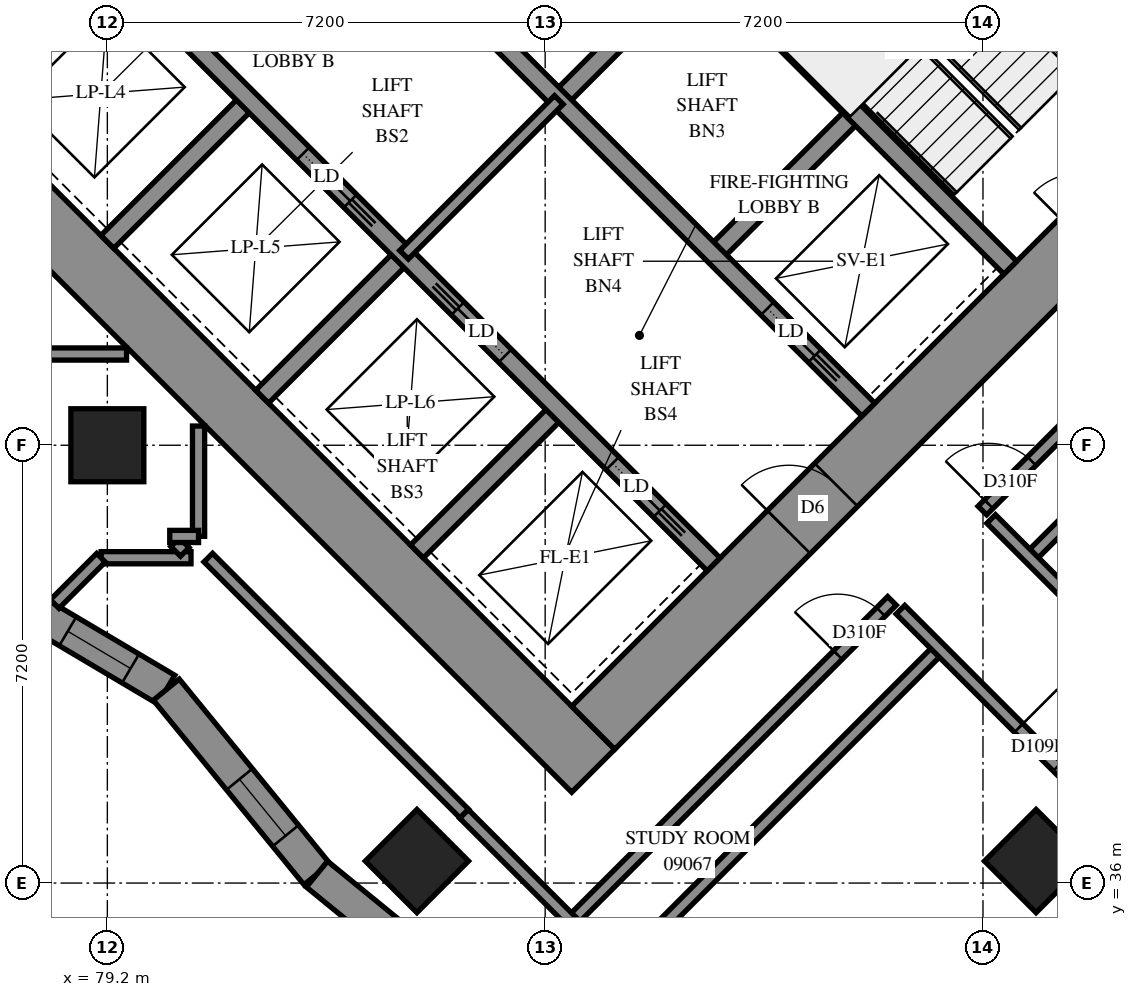
"""IFC4 building model, lengths in metres.
Left out: names, types, materials, properties, quantities, classifications, styles, units other than length and angle.
Written with IfcOpenShell. Run it as: python <this file> out.ifc"""

import sys

from ifc_helpers import new_model, si_unit, direction, frame, frame_2d, origin, origin_2d, place, context, subcontext, project, spatial, polyline, rectangle, outline, extrude, element, fill, save


model = new_model("IFC4")
c1 = context("Model", 3, precision=1e-05, world=origin(), true_north=direction((0.0, 1.0)))
c2 = subcontext(c1, "Body", "Model", "MODEL_VIEW")
j1 = project(units=[si_unit("LENGTHUNIT", "METRE"), si_unit("PLANEANGLEUNIT", "RADIAN")], contexts=[c1])
p1 = place(None, origin())
s1 = spatial("IfcSite", under=j1, at=p1, CompositionType="ELEMENT")
p2 = place(p1, origin())
s2 = spatial("IfcBuilding", under=s1, at=p2, CompositionType="ELEMENT")
p3 = place(p2, frame((0.0, 0.0, 37.2)))
s3 = spatial("IfcBuildingStorey", under=s2, at=p3, CompositionType="ELEMENT", Elevation=37.2)
for number, where, z_axis, x_axis in (
    (1, (79.2, 43.2, 0.0), (0.0, 0.0, 1.0), (1.0, 0.0, 0.0)),
    (2, (84.291, 36.362, 0.0), (0.0, 0.0, 1.0), (0.707, -0.707, 0.0)),
    (3, (94.474, 36.362, 0.0), (0.0, 0.0, 1.0), (0.707, -0.707, 0.0)),
):
    element("IfcColumn", number, at=place(p3, frame(where, z_axis=z_axis, x_axis=x_axis)), inside=s3, PredefinedType="COLUMN", context=c2, shape_type="SweptSolid", body=[
        extrude(rectangle(XDim=1.2, YDim=1.2, at=origin_2d()), origin(), (0.0, 0.0, 1.0), 3.1),
    ])
p4 = place(p3, frame((75.594, 49.443, -0.3), z_axis=(0.0, 0.0, 1.0), x_axis=(0.7071037324, -0.70710983, 0.0)))
e4 = element("IfcWall", 4, at=p4, inside=s3, PredefinedType="SHEAR", context=c2, shape_type="SweptSolid", body=[
    extrude(rectangle(XDim=16.4, YDim=1.0, at=frame_2d((8.2, 0.0))), origin(), (0.0, 0.0, 1.0), 2.7),
])
p5 = place(p3, frame((86.483, 60.333, -0.3), z_axis=(0.0, 0.0, 1.0), x_axis=(0.70710983, -0.7071037324, 0.0)))
e5 = element("IfcWall", 5, at=p5, inside=s3, PredefinedType="SHEAR", context=c2, shape_type="SweptSolid", body=[
    extrude(rectangle(XDim=16.4, YDim=1.0, at=frame_2d((8.2, 0.0))), origin(), (0.0, 0.0, 1.0), 2.7),
])
p6 = place(p5, frame((11.0, 0.0, 0.3)))
e6 = element("IfcOpeningElement", 6, at=p6, cuts=e5, PredefinedType="OPENING", context=c2, shape_type="SweptSolid", body=[
    extrude(rectangle(XDim=0.8, YDim=2.1, at=frame_2d((0.4, 1.05))), frame((0.0, 0.51, 0.0), z_axis=(0.0, -1.0, 0.0), x_axis=(1.0, 0.0, 0.0)), (0.0, 0.0, 1.0), 1.02),
])
p7 = place(p3, frame((76.301, 49.443, -0.3), z_axis=(0.0, 0.0, 1.0), x_axis=(0.7071067812, 0.7071067812, 0.0)))
e7 = element("IfcWall", 7, at=p7, inside=s3, PredefinedType="SHEAR", context=c2, shape_type="SweptSolid", body=[
    extrude(rectangle(XDim=14.4, YDim=1.0, at=frame_2d((7.2, 0.0))), origin(), (0.0, 0.0, 1.0), 2.7),
])
p8 = place(p7, frame((4.55, 0.0, 0.3)))
e8 = element("IfcOpeningElement", 8, at=p8, cuts=e7, PredefinedType="OPENING", context=c2, shape_type="SweptSolid", body=[
    extrude(rectangle(XDim=1.1, YDim=2.1, at=frame_2d((0.55, 1.05))), frame((0.0, 0.51, 0.0), z_axis=(0.0, -1.0, 0.0), x_axis=(1.0, 0.0, 0.0)), (0.0, 0.0, 1.0), 1.02),
])
p9 = place(p7, frame((11.35, 0.0, 0.3)))
e9 = element("IfcOpeningElement", 9, at=p9, cuts=e7, PredefinedType="OPENING", context=c2, shape_type="SweptSolid", body=[
    extrude(rectangle(XDim=1.1, YDim=2.1, at=frame_2d((0.55, 1.05))), frame((0.0, 0.51, 0.0), z_axis=(0.0, -1.0, 0.0), x_axis=(1.0, 0.0, 0.0)), (0.0, 0.0, 1.0), 1.02),
])
p10 = place(p3, frame((87.19, 38.554, -0.3), z_axis=(0.0, 0.0, 1.0), x_axis=(0.707103309, 0.7071102534, 0.0)))
e10 = element("IfcWall", 10, at=p10, inside=s3, PredefinedType="SHEAR", context=c2, shape_type="SweptSolid", body=[
    extrude(rectangle(XDim=14.4, YDim=1.0, at=frame_2d((7.2, 0.0))), origin(), (0.0, 0.0, 1.0), 2.7),
])
p11 = place(p10, frame((4.55, 0.0, 0.3)))
e11 = element("IfcOpeningElement", 11, at=p11, cuts=e10, PredefinedType="OPENING", context=c2, shape_type="SweptSolid", body=[
    extrude(rectangle(XDim=1.1, YDim=2.1, at=frame_2d((0.55, 1.05))), frame((0.0, 0.51, 0.0), z_axis=(0.0, -1.0, 0.0), x_axis=(1.0, 0.0, 0.0)), (0.0, 0.0, 1.0), 1.02),
])
p12 = place(p10, frame((11.35, 0.0, 0.3)))
e12 = element("IfcOpeningElement", 12, at=p12, cuts=e10, PredefinedType="OPENING", context=c2, shape_type="SweptSolid", body=[
    extrude(rectangle(XDim=1.1, YDim=2.1, at=frame_2d((0.55, 1.05))), frame((0.0, 0.51, 0.0), z_axis=(0.0, -1.0, 0.0), x_axis=(1.0, 0.0, 0.0)), (0.0, 0.0, 1.0), 1.02),
])
p13 = place(p3, frame((79.2, 46.544, 0.0), z_axis=(0.0, 0.0, 1.0), x_axis=(0.7071219326, 0.7070916295, 0.0)))
e13 = element("IfcWall", 13, at=p13, inside=s3, PredefinedType="SOLIDWALL", context=c2, shape_type="SweptSolid", body=[
    extrude(rectangle(XDim=3.3, YDim=0.3, at=frame_2d((1.65, 0.0))), origin(), (0.0, 0.0, 1.0), 3.1),
])
p14 = place(p3, frame((81.746, 43.999, 0.0), z_axis=(0.0, 0.0, 1.0), x_axis=(0.7071067812, 0.7071067812, 0.0)))
e14 = element("IfcWall", 14, at=p14, inside=s3, PredefinedType="SOLIDWALL", context=c2, shape_type="SweptSolid", body=[
    extrude(rectangle(XDim=3.3, YDim=0.3, at=frame_2d((1.65, 0.0))), origin(), (0.0, 0.0, 1.0), 3.1),
])
p15 = place(p3, frame((86.625, 48.878, 0.0), z_axis=(0.0, 0.0, 1.0), x_axis=(0.7071067812, 0.7071067812, 0.0)))
e15 = element("IfcWall", 15, at=p15, inside=s3, PredefinedType="SOLIDWALL", context=c2, shape_type="SweptSolid", body=[
    extrude(rectangle(XDim=3.3, YDim=0.3, at=frame_2d((1.65, 0.0))), origin(), (0.0, 0.0, 1.0), 3.1),
])
p16 = place(p3, frame((84.291, 41.453, 0.0), z_axis=(0.0, 0.0, 1.0), x_axis=(0.7071067812, 0.7071067812, 0.0)))
e16 = element("IfcWall", 16, at=p16, inside=s3, PredefinedType="SOLIDWALL", context=c2, shape_type="SweptSolid", body=[
    extrude(rectangle(XDim=3.3, YDim=0.3, at=frame_2d((1.65, 0.0))), origin(), (0.0, 0.0, 1.0), 3.1),
])
p17 = place(p3, frame((89.17, 46.332, 0.0), z_axis=(0.0, 0.0, 1.0), x_axis=(0.7071067812, 0.7071067812, 0.0)))
e17 = element("IfcWall", 17, at=p17, inside=s3, PredefinedType="SOLIDWALL", context=c2, shape_type="SweptSolid", body=[
    extrude(rectangle(XDim=3.3, YDim=0.3, at=frame_2d((1.65, 0.0))), origin(), (0.0, 0.0, 1.0), 3.1),
])
p18 = place(p3, frame((78.988, 51.423, 0.0), z_axis=(0.0, 0.0, 1.0), x_axis=(0.7071067812, -0.7071067812, 0.0)))
e18 = element("IfcWall", 18, at=p18, inside=s3, PredefinedType="SOLIDWALL", context=c2, shape_type="SweptSolid", body=[
    extrude(rectangle(XDim=14.4, YDim=0.3, at=frame_2d((7.2, 0.0))), origin(), (0.0, 0.0, 1.0), 3.1),
])
p19 = place(p18, frame((1.25, 0.0, 0.0)))
e19 = element("IfcOpeningElement", 19, at=p19, cuts=e18, PredefinedType="OPENING", context=c2, shape_type="SweptSolid", body=[
    extrude(rectangle(XDim=1.1, YDim=2.1, at=frame_2d((0.55, 1.05))), frame((0.0, 0.16, 0.0), z_axis=(0.0, -1.0, 0.0), x_axis=(1.0, 0.0, 0.0)), (0.0, 0.0, 1.0), 0.32),
])
p20 = place(p18, frame((4.85, 0.0, 0.0)))
e20 = element("IfcOpeningElement", 20, at=p20, cuts=e18, PredefinedType="OPENING", context=c2, shape_type="SweptSolid", body=[
    extrude(rectangle(XDim=1.1, YDim=2.1, at=frame_2d((0.55, 1.05))), frame((0.0, 0.16, 0.0), z_axis=(0.0, -1.0, 0.0), x_axis=(1.0, 0.0, 0.0)), (0.0, 0.0, 1.0), 0.32),
])
p21 = place(p18, frame((8.45, 0.0, 0.0)))
e21 = element("IfcOpeningElement", 21, at=p21, cuts=e18, PredefinedType="OPENING", context=c2, shape_type="SweptSolid", body=[
    extrude(rectangle(XDim=1.1, YDim=2.1, at=frame_2d((0.55, 1.05))), frame((0.0, 0.16, 0.0), z_axis=(0.0, -1.0, 0.0), x_axis=(1.0, 0.0, 0.0)), (0.0, 0.0, 1.0), 0.32),
])
p22 = place(p18, frame((12.05, 0.0, 0.0)))
e22 = element("IfcOpeningElement", 22, at=p22, cuts=e18, PredefinedType="OPENING", context=c2, shape_type="SweptSolid", body=[
    extrude(rectangle(XDim=1.1, YDim=2.1, at=frame_2d((0.55, 1.05))), frame((0.0, 0.16, 0.0), z_axis=(0.0, -1.0, 0.0), x_axis=(1.0, 0.0, 0.0)), (0.0, 0.0, 1.0), 0.32),
])
p23 = place(p3, frame((81.534, 53.969, 0.0), z_axis=(0.0, 0.0, 1.0), x_axis=(0.707103309, -0.7071102534, 0.0)))
e23 = element("IfcWall", 23, at=p23, inside=s3, PredefinedType="SOLIDWALL", context=c2, shape_type="SweptSolid", body=[
    extrude(rectangle(XDim=14.4, YDim=0.3, at=frame_2d((7.2, 0.0))), origin(), (0.0, 0.0, 1.0), 3.1),
])
p24 = place(p23, frame((12.05, 0.0, 0.0)))
e24 = element("IfcOpeningElement", 24, at=p24, cuts=e23, PredefinedType="OPENING", context=c2, shape_type="SweptSolid", body=[
    extrude(rectangle(XDim=1.1, YDim=2.1, at=frame_2d((0.55, 1.05))), frame((0.0, 0.16, 0.0), z_axis=(0.0, -1.0, 0.0), x_axis=(1.0, 0.0, 0.0)), (0.0, 0.0, 1.0), 0.32),
])
p25 = place(p3, frame((88.958, 51.211, 0.0), z_axis=(0.0, 0.0, 1.0), x_axis=(0.7070998367, -0.7071137256, 0.0)))
e25 = element("IfcWall", 25, at=p25, inside=s3, PredefinedType="SOLIDWALL", context=c2, shape_type="SweptSolid", body=[
    extrude(rectangle(XDim=7.2, YDim=0.3, at=frame_2d((3.6, 0.0))), origin(), (0.0, 0.0, 1.0), 3.1),
])
p26 = place(p3, frame((76.656, 41.263, 0.0), z_axis=(0.0, 0.0, 1.0), x_axis=(0.8602155685, -0.5099305597, 0.0)))
e26 = element("IfcWall", 26, at=p26, inside=s3, PredefinedType="SOLIDWALL", context=c2, shape_type="SweptSolid", body=[
    extrude(outline(polyline([(0.035, -0.275), (4.036, -0.275), (4.133, 0.275), (-0.035, 0.275), (0.035, -0.275)])), origin(), (0.0, 0.0, 1.0), 3.1),
])
p27 = place(p26, frame((2.202, 0.0, 0.5)))
e27 = element("IfcOpeningElement", 27, at=p27, cuts=e26, PredefinedType="OPENING", context=c2, shape_type="SweptSolid", body=[
    extrude(rectangle(XDim=1.2, YDim=2.45, at=frame_2d((0.6, 1.225))), frame((0.0, 0.285, 0.0), z_axis=(0.0, -1.0, 0.0), x_axis=(1.0, 0.0, 0.0)), (0.0, 0.0, 1.0), 0.57),
])
p28 = place(p26, frame((0.848, 0.0, 0.45)))
e28 = element("IfcOpeningElement", 28, at=p28, cuts=e26, PredefinedType="OPENING", context=c2, shape_type="SweptSolid", body=[
    extrude(rectangle(XDim=0.8, YDim=2.5, at=frame_2d((0.4, 1.25))), frame((0.0, 0.285, 0.0), z_axis=(0.0, -1.0, 0.0), x_axis=(1.0, 0.0, 0.0)), (0.0, 0.0, 1.0), 0.57),
])
p29 = place(p3, frame((80.169, 39.181, 0.0), z_axis=(0.0, 0.0, 1.0), x_axis=(0.6325618832, -0.7745098217, 0.0)))
e29 = element("IfcWall", 29, at=p29, inside=s3, PredefinedType="SOLIDWALL", context=c2, shape_type="SweptSolid", body=[
    extrude(outline(polyline([(0.049, -0.275), (3.945, -0.275), (3.889, 0.275), (-0.049, 0.275), (0.049, -0.275)])), origin(), (0.0, 0.0, 1.0), 3.1),
])
p30 = place(p29, frame((1.902, 0.0, 0.5)))
e30 = element("IfcOpeningElement", 30, at=p30, cuts=e29, PredefinedType="OPENING", context=c2, shape_type="SweptSolid", body=[
    extrude(rectangle(XDim=1.2, YDim=2.45, at=frame_2d((0.6, 1.225))), frame((0.0, 0.285, 0.0), z_axis=(0.0, -1.0, 0.0), x_axis=(1.0, 0.0, 0.0)), (0.0, 0.0, 1.0), 0.57),
])
p31 = place(p3, frame((82.647, 36.147, 0.0), z_axis=(0.0, 0.0, 1.0), x_axis=(0.7745059294, -0.6325666489, 0.0)))
e31 = element("IfcWall", 31, at=p31, inside=s3, PredefinedType="SOLIDWALL", context=c2, shape_type="SweptSolid", body=[
    extrude(outline(polyline([(-0.028, -0.275), (3.868, -0.275), (3.924, 0.275), (0.028, 0.275), (-0.028, -0.275)])), origin(), (0.0, 0.0, 1.0), 3.1),
])
p32 = place(p31, frame((1.756, 0.0, 0.5)))
e32 = element("IfcOpeningElement", 32, at=p32, cuts=e31, PredefinedType="OPENING", context=c2, shape_type="SweptSolid", body=[
    extrude(rectangle(XDim=1.2, YDim=2.45, at=frame_2d((0.6, 1.225))), frame((0.0, 0.285, 0.0), z_axis=(0.0, -1.0, 0.0), x_axis=(1.0, 0.0, 0.0)), (0.0, 0.0, 1.0), 0.57),
])
p33 = place(p3, frame((91.313, 53.354, 0.0), z_axis=(0.0, 0.0, 1.0), x_axis=(0.7071140275, -0.7070995348, 0.0)))
e33 = element("IfcWall", 33, at=p33, inside=s3, PredefinedType="PARTITIONING", context=c2, shape_type="SweptSolid", body=[
    extrude(rectangle(XDim=6.9, YDim=0.15, at=frame_2d((3.45, 0.0))), origin(), (0.0, 0.0, 1.0), 3.1),
])
p34 = place(p3, frame((84.079, 46.332, 0.0), z_axis=(0.0, 0.0, 1.0), x_axis=(0.7071067812, 0.7071067812, 0.0)))
e34 = element("IfcWall", 34, at=p34, inside=s3, PredefinedType="PARTITIONING", context=c2, shape_type="SweptSolid", body=[
    extrude(rectangle(XDim=3.6, YDim=0.2, at=frame_2d((1.8, 0.0))), origin(), (0.0, 0.0, 1.0), 3.1),
])
p35 = place(p3, frame((94.367, 41.349, 0.0), z_axis=(0.0, 0.0, 1.0), x_axis=(0.7071109931, 0.7071025693, 0.0)))
e35 = element("IfcWall", 35, at=p35, inside=s3, PredefinedType="PARTITIONING", context=c2, shape_type="SweptSolid", body=[
    extrude(rectangle(XDim=11.871, YDim=0.2, at=frame_2d((5.936, 0.0))), origin(), (0.0, 0.0, 1.0), 3.1),
])
p36 = place(p3, frame((93.59, 42.126, 0.0), z_axis=(0.0, 0.0, 1.0), x_axis=(0.7071067812, 0.7071067812, 0.0)))
e36 = element("IfcWall", 36, at=p36, inside=s3, PredefinedType="PARTITIONING", context=c2, shape_type="SweptSolid", body=[
    extrude(rectangle(XDim=9.849, YDim=0.2, at=frame_2d((4.924, 0.0))), origin(), (0.0, 0.0, 1.0), 3.1),
])
p37 = place(p36, frame((0.148, 0.0, 0.0)))
e37 = element("IfcOpeningElement", 37, at=p37, cuts=e36, PredefinedType="OPENING", context=c2, shape_type="SweptSolid", body=[
    extrude(rectangle(XDim=1.0, YDim=2.1, at=frame_2d((0.5, 1.05))), frame((0.0, 0.11, 0.0), z_axis=(0.0, -1.0, 0.0), x_axis=(1.0, 0.0, 0.0)), (0.0, 0.0, 1.0), 0.22),
])
p38 = place(p3, frame((86.33, 33.302, 0.0), z_axis=(0.0, 0.0, 1.0), x_axis=(0.7069989149, 0.707214631, 0.0)))
e38 = element("IfcWall", 38, at=p38, inside=s3, PredefinedType="PARTITIONING", context=c2, shape_type="SweptSolid", body=[
    extrude(rectangle(XDim=9.271, YDim=0.2, at=frame_2d((4.636, 0.0))), origin(), (0.0, 0.0, 1.0), 3.1),
])
p39 = place(p3, frame((92.243, 40.495, 0.0), z_axis=(0.0, 0.0, 1.0), x_axis=(0.7071067812, -0.7071067812, 0.0)))
e39 = element("IfcWall", 39, at=p39, inside=s3, PredefinedType="PARTITIONING", context=c2, shape_type="SweptSolid", body=[
    extrude(rectangle(XDim=8.101, YDim=0.2, at=frame_2d((4.05, 0.0))), origin(), (0.0, 0.0, 1.0), 3.1),
])
p40 = place(p39, frame((2.75, 0.0, 0.0)))
e40 = element("IfcOpeningElement", 40, at=p40, cuts=e39, PredefinedType="OPENING", context=c2, shape_type="SweptSolid", body=[
    extrude(rectangle(XDim=0.9, YDim=2.1, at=frame_2d((0.45, 1.05))), frame((0.0, 0.11, 0.0), z_axis=(0.0, -1.0, 0.0), x_axis=(1.0, 0.0, 0.0)), (0.0, 0.0, 1.0), 0.22),
])
p41 = place(p3, frame((86.836, 35.372, 0.0), z_axis=(0.0, 0.0, 1.0), x_axis=(0.7071067812, 0.7071067812, 0.0)))
e41 = element("IfcWall", 41, at=p41, inside=s3, PredefinedType="PARTITIONING", context=c2, shape_type="SweptSolid", body=[
    extrude(rectangle(XDim=7.45, YDim=0.2, at=frame_2d((3.725, 0.0))), origin(), (0.0, 0.0, 1.0), 3.1),
])
p42 = place(p41, frame((6.192, 0.0, 0.0)))
e42 = element("IfcOpeningElement", 42, at=p42, cuts=e41, PredefinedType="OPENING", context=c2, shape_type="SweptSolid", body=[
    extrude(rectangle(XDim=1.0, YDim=2.1, at=frame_2d((0.5, 1.05))), frame((0.0, 0.11, 0.0), z_axis=(0.0, -1.0, 0.0), x_axis=(1.0, 0.0, 0.0)), (0.0, 0.0, 1.0), 0.22),
])
p43 = place(p3, frame((85.07, 37.142, 0.0), z_axis=(0.0, 0.0, 1.0), x_axis=(-0.7070899851, 0.7071235769, 0.0)))
e43 = element("IfcWall", 43, at=p43, inside=s3, PredefinedType="PARTITIONING", context=c2, shape_type="SweptSolid", body=[
    extrude(rectangle(XDim=5.954, YDim=0.2, at=frame_2d((2.977, 0.0))), origin(), (0.0, 0.0, 1.0), 3.1),
])
p44 = place(p3, frame((93.735, 41.987, 0.0), z_axis=(0.0, 0.0, 1.0), x_axis=(0.7071067812, -0.7071067812, 0.0)))
e44 = element("IfcWall", 44, at=p44, inside=s3, PredefinedType="PARTITIONING", context=c2, shape_type="SweptSolid", body=[
    extrude(rectangle(XDim=4.5, YDim=0.2, at=frame_2d((2.25, 0.0))), origin(), (0.0, 0.0, 1.0), 3.1),
])
p45 = place(p44, frame((3.274, 0.0, 0.0)))
e45 = element("IfcOpeningElement", 45, at=p45, cuts=e44, PredefinedType="OPENING", context=c2, shape_type="SweptSolid", body=[
    extrude(rectangle(XDim=1.0, YDim=2.1, at=frame_2d((0.5, 1.05))), frame((0.0, 0.11, 0.0), z_axis=(0.0, -1.0, 0.0), x_axis=(1.0, 0.0, 0.0)), (0.0, 0.0, 1.0), 0.22),
])
p46 = place(p3, frame((85.065, 37.137, 0.0), z_axis=(0.0, 0.0, 1.0), x_axis=(0.7071067812, -0.7071067812, 0.0)))
e46 = element("IfcWall", 46, at=p46, inside=s3, PredefinedType="PARTITIONING", context=c2, shape_type="SweptSolid", body=[
    extrude(rectangle(XDim=2.5, YDim=0.2, at=frame_2d((1.25, 0.0))), origin(), (0.0, 0.0, 1.0), 3.1),
])
p47 = place(p3, frame((94.511, 34.839, 0.0), z_axis=(0.0, 0.0, 1.0), x_axis=(0.7075233388, 0.706689978, 0.0)))
e47 = element("IfcWall", 47, at=p47, inside=s3, PredefinedType="PARTITIONING", context=c2, shape_type="SweptSolid", body=[
    extrude(rectangle(XDim=2.4, YDim=0.15, at=frame_2d((1.2, 0.0))), origin(), (0.0, 0.0, 1.0), 3.1),
])
for number, where, z_axis, x_axis in (
    (48, (77.702, 44.7, 0.0), (0.0, 0.0, 1.0), (1.0, 0.0, 0.0)),
    (49, (80.7, 41.702, 0.0), (0.0, 0.0, 1.0), (0.0, 1.0, 0.0)),
):
    element("IfcWall", number, at=place(p3, frame(where, z_axis=z_axis, x_axis=x_axis)), inside=s3, PredefinedType="PARTITIONING", context=c2, shape_type="SweptSolid", body=[
        extrude(rectangle(XDim=1.814, YDim=0.2, at=frame_2d((0.907, 0.0))), origin(), (0.0, 0.0, 1.0), 3.1),
    ])
p48 = place(p3, frame((79.098, 41.35, 0.0), z_axis=(0.0, 0.0, 1.0), x_axis=(1.0, 0.0, 0.0)))
e50 = element("IfcWall", 50, at=p48, inside=s3, PredefinedType="PARTITIONING", context=c2, shape_type="SweptSolid", body=[
    extrude(rectangle(XDim=1.478, YDim=0.2, at=frame_2d((0.739, 0.0))), origin(), (0.0, 0.0, 1.0), 3.1),
])
p49 = place(p3, frame((78.334, 40.588, 0.0), z_axis=(0.0, 0.0, 1.0), x_axis=(0.7071067812, 0.7071067812, 0.0)))
e51 = element("IfcWall", 51, at=p49, inside=s3, PredefinedType="PARTITIONING", context=c2, shape_type="SweptSolid", body=[
    extrude(rectangle(XDim=1.078, YDim=0.2, at=frame_2d((0.539, 0.0))), origin(), (0.0, 0.0, 1.0), 3.1),
])
p50 = place(p3, frame((80.315, 41.605, 0.0), z_axis=(0.0, 0.0, 1.0), x_axis=(0.7071067812, -0.7071067812, 0.0)))
e52 = element("IfcWall", 52, at=p50, inside=s3, PredefinedType="PARTITIONING", context=c2, shape_type="SweptSolid", body=[
    extrude(rectangle(XDim=0.225, YDim=0.2, at=frame_2d((0.113, 0.0))), origin(), (0.0, 0.0, 1.0), 3.1),
])
p51 = place(p3, frame((80.226, 41.7, 0.0), z_axis=(0.0, 0.0, 1.0), x_axis=(1.0, 0.0, 0.0)))
e53 = element("IfcWall", 53, at=p51, inside=s3, PredefinedType="PARTITIONING", context=c2, shape_type="SweptSolid", body=[
    extrude(rectangle(XDim=0.474, YDim=0.2, at=frame_2d((0.237, 0.0))), origin(), (0.0, 0.0, 1.0), 3.1),
])
p52 = place(p27, origin())
e54 = element("IfcWindow", 54, at=p52, inside=s3, PartitioningType="SINGLE_PANEL", PredefinedType="WINDOW", context=c2, shape_type="SweptSolid", body=[
    extrude(rectangle(XDim=1.2, YDim=2.45, at=frame_2d((0.6, 1.225))), frame((0.0, 0.155, 0.0), z_axis=(0.0, -1.0, 0.0), x_axis=(1.0, 0.0, 0.0)), (0.0, 0.0, 1.0), 0.06),
])
fill(e27, e54)
p53 = place(p30, origin())
e55 = element("IfcWindow", 55, at=p53, inside=s3, PartitioningType="SINGLE_PANEL", PredefinedType="WINDOW", context=c2, shape_type="SweptSolid", body=[
    extrude(rectangle(XDim=1.2, YDim=2.45, at=frame_2d((0.6, 1.225))), frame((0.0, 0.155, 0.0), z_axis=(0.0, -1.0, 0.0), x_axis=(1.0, 0.0, 0.0)), (0.0, 0.0, 1.0), 0.06),
])
fill(e30, e55)
p54 = place(p11, origin())
e56 = element("IfcDoor", 56, at=p54, inside=s3, OperationType="DOUBLE_DOOR_SINGLE_SWING", PredefinedType="DOOR", context=c2, shape_type="SweptSolid", body=[
    extrude(rectangle(XDim=1.1, YDim=2.1, at=frame_2d((0.55, 1.05))), frame((0.0, 0.025, 0.0), z_axis=(0.0, -1.0, 0.0), x_axis=(1.0, 0.0, 0.0)), (0.0, 0.0, 1.0), 0.05),
])
fill(e11, e56)
p55 = place(p20, origin())
e57 = element("IfcDoor", 57, at=p55, inside=s3, OperationType="SLIDING_TO_RIGHT", PredefinedType="DOOR", context=c2, shape_type="SweptSolid", body=[
    extrude(rectangle(XDim=1.1, YDim=2.1, at=frame_2d((0.55, 1.05))), frame((0.0, 0.025, 0.0), z_axis=(0.0, -1.0, 0.0), x_axis=(1.0, 0.0, 0.0)), (0.0, 0.0, 1.0), 0.05),
])
fill(e20, e57)
p56 = place(p21, origin())
e58 = element("IfcDoor", 58, at=p56, inside=s3, OperationType="SLIDING_TO_LEFT", PredefinedType="DOOR", context=c2, shape_type="SweptSolid", body=[
    extrude(rectangle(XDim=1.1, YDim=2.1, at=frame_2d((0.55, 1.05))), frame((0.0, 0.025, 0.0), z_axis=(0.0, -1.0, 0.0), x_axis=(1.0, 0.0, 0.0)), (0.0, 0.0, 1.0), 0.05),
])
fill(e21, e58)
p57 = place(p22, origin())
e59 = element("IfcDoor", 59, at=p57, inside=s3, OperationType="SLIDING_TO_RIGHT", PredefinedType="DOOR", context=c2, shape_type="SweptSolid", body=[
    extrude(rectangle(XDim=1.1, YDim=2.1, at=frame_2d((0.55, 1.05))), frame((0.0, 0.025, 0.0), z_axis=(0.0, -1.0, 0.0), x_axis=(1.0, 0.0, 0.0)), (0.0, 0.0, 1.0), 0.05),
])
fill(e22, e59)
p58 = place(p24, origin())
e60 = element("IfcDoor", 60, at=p58, inside=s3, OperationType="SLIDING_TO_RIGHT", PredefinedType="DOOR", context=c2, shape_type="SweptSolid", body=[
    extrude(rectangle(XDim=1.1, YDim=2.1, at=frame_2d((0.55, 1.05))), frame((0.0, 0.025, 0.0), z_axis=(0.0, -1.0, 0.0), x_axis=(1.0, 0.0, 0.0)), (0.0, 0.0, 1.0), 0.05),
])
fill(e24, e60)
p59 = place(p37, origin())
e61 = element("IfcDoor", 61, at=p59, inside=s3, OperationType="SINGLE_SWING_LEFT", PredefinedType="DOOR", context=c2, shape_type="SweptSolid", body=[
    extrude(rectangle(XDim=1.0, YDim=2.1, at=frame_2d((0.5, 1.05))), frame((0.0, 0.025, 0.0), z_axis=(0.0, -1.0, 0.0), x_axis=(1.0, 0.0, 0.0)), (0.0, 0.0, 1.0), 0.05),
])
fill(e37, e61)
p60 = place(p42, origin())
e62 = element("IfcDoor", 62, at=p60, inside=s3, OperationType="SINGLE_SWING_RIGHT", PredefinedType="DOOR", context=c2, shape_type="SweptSolid", body=[
    extrude(rectangle(XDim=1.0, YDim=2.1, at=frame_2d((0.5, 1.05))), frame((0.0, 0.025, 0.0), z_axis=(0.0, -1.0, 0.0), x_axis=(1.0, 0.0, 0.0)), (0.0, 0.0, 1.0), 0.05),
])
fill(e42, e62)
p61 = place(p40, origin())
e63 = element("IfcDoor", 63, at=p61, inside=s3, OperationType="SINGLE_SWING_LEFT", PredefinedType="DOOR", context=c2, shape_type="SweptSolid", body=[
    extrude(rectangle(XDim=0.9, YDim=2.1, at=frame_2d((0.45, 1.05))), frame((0.0, 0.025, 0.0), z_axis=(0.0, -1.0, 0.0), x_axis=(1.0, 0.0, 0.0)), (0.0, 0.0, 1.0), 0.05),
])
fill(e40, e63)
save(model, sys.argv[1])
